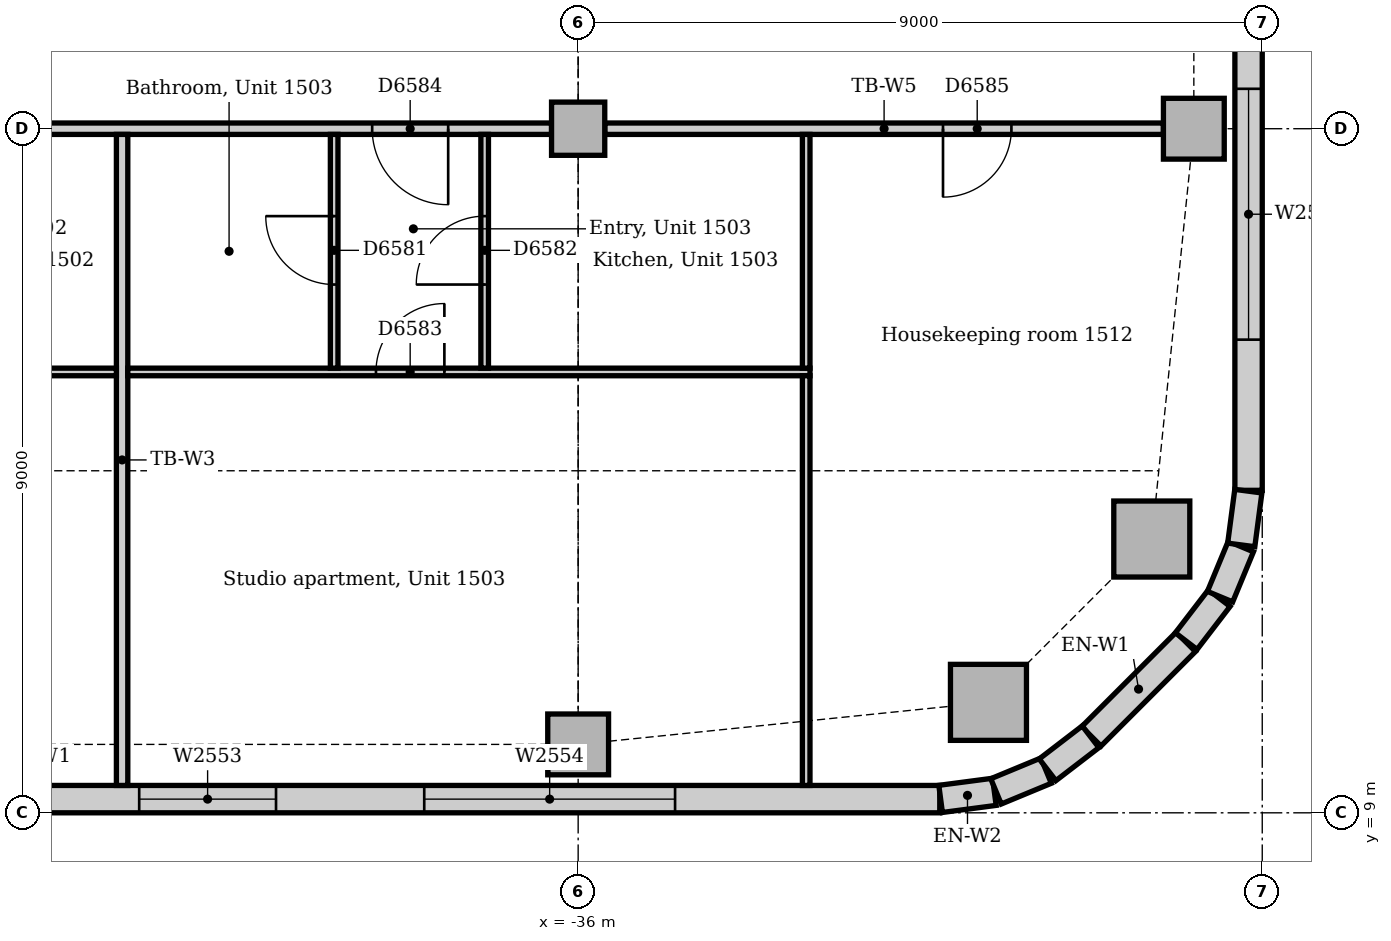
"""IFC4 building model, lengths in metres.
Left out: names, types, materials, properties, quantities, classifications, styles, units other than length and angle.
Written with IfcOpenShell. Run it as: python <this file> out.ifc"""

import sys

from ifc_helpers import new_model, si_unit, direction, frame, frame_2d, origin, origin_2d, place, context, subcontext, project, spatial, rectangle, extrude, element, fill, save


model = new_model("IFC4")
c1 = context("Model", 3, precision=1e-05, world=origin(), true_north=direction((0.0, 1.0)))
c2 = subcontext(c1, "Body", "Model", "MODEL_VIEW")
j1 = project(units=[si_unit("LENGTHUNIT", "METRE"), si_unit("PLANEANGLEUNIT", "RADIAN")], contexts=[c1])
p1 = place(None, origin())
s1 = spatial("IfcSite", under=j1, at=p1, CompositionType="ELEMENT")
p2 = place(p1, origin())
s2 = spatial("IfcBuilding", under=s1, at=p2, CompositionType="ELEMENT")
p3 = place(p2, frame((0.0, 0.0, 67.0)))
s3 = spatial("IfcBuildingStorey", under=s2, at=p3, CompositionType="ELEMENT", Elevation=67.0)
for number, where, z_axis, x_axis in (
    (1, (-30.602, 10.453, 0.0), (0.0, 0.0, 1.0), (1.0, 0.0, 0.0)),
    (2, (-28.453, 12.602, 0.0), (0.0, 0.0, 1.0), (1.0, 0.0, 0.0)),
):
    element("IfcColumn", number, at=place(p3, frame(where, z_axis=z_axis, x_axis=x_axis)), inside=s3, PredefinedType="COLUMN", context=c2, shape_type="SweptSolid", body=[
        extrude(rectangle(XDim=1.0, YDim=1.0, at=origin_2d()), origin(), (0.0, 0.0, 1.0), 3.85),
    ])
for number, where, z_axis, x_axis in (
    (3, (-36.0, 9.9, 0.0), (0.0, 0.0, 1.0), (1.0, 0.0, 0.0)),
    (4, (-27.9, 18.0, 0.0), (0.0, 0.0, 1.0), (1.0, 0.0, 0.0)),
):
    element("IfcColumn", number, at=place(p3, frame(where, z_axis=z_axis, x_axis=x_axis)), inside=s3, PredefinedType="COLUMN", context=c2, shape_type="SweptSolid", body=[
        extrude(rectangle(XDim=0.8, YDim=0.8, at=origin_2d()), origin(), (0.0, 0.0, 1.0), 3.85),
    ])
p4 = place(p3, frame((-36.0, 18.0, 0.0), z_axis=(0.0, 0.0, 1.0), x_axis=(1.0, 0.0, 0.0)))
e5 = element("IfcColumn", 5, at=p4, inside=s3, PredefinedType="COLUMN", context=c2, shape_type="SweptSolid", body=[
    extrude(rectangle(XDim=0.7, YDim=0.7, at=origin_2d()), origin(), (0.0, 0.0, 1.0), 3.85),
])
p5 = place(p3, frame((-55.007, 9.18, 0.0), z_axis=(0.0, 0.0, 1.0), x_axis=(1.0, 0.0, 0.0)))
e6 = element("IfcWall", 6, at=p5, inside=s3, PredefinedType="STANDARD", context=c2, shape_type="SweptSolid", body=[
    extrude(rectangle(XDim=23.765, YDim=0.36, at=frame_2d((11.882, 0.0))), origin(), (0.0, 0.0, 1.0), 3.85),
])
p6 = place(p5, frame((4.232, 0.0, 0.9)))
e7 = element("IfcOpeningElement", 7, at=p6, cuts=e6, PredefinedType="OPENING", context=c2, shape_type="SweptSolid", body=[
    extrude(rectangle(XDim=1.8, YDim=1.6, at=frame_2d((0.9, 0.8))), frame((0.0, 0.19, 0.0), z_axis=(0.0, -1.0, 0.0), x_axis=(1.0, 0.0, 0.0)), (0.0, 0.0, 1.0), 0.38),
])
p7 = place(p5, frame((7.982, 0.0, 0.9)))
e8 = element("IfcOpeningElement", 8, at=p7, cuts=e6, PredefinedType="OPENING", context=c2, shape_type="SweptSolid", body=[
    extrude(rectangle(XDim=3.3, YDim=1.6, at=frame_2d((1.65, 0.8))), frame((0.0, 0.19, 0.0), z_axis=(0.0, -1.0, 0.0), x_axis=(1.0, 0.0, 0.0)), (0.0, 0.0, 1.0), 0.38),
])
p8 = place(p5, frame((13.232, 0.0, 0.9)))
e9 = element("IfcOpeningElement", 9, at=p8, cuts=e6, PredefinedType="OPENING", context=c2, shape_type="SweptSolid", body=[
    extrude(rectangle(XDim=1.8, YDim=1.6, at=frame_2d((0.9, 0.8))), frame((0.0, 0.19, 0.0), z_axis=(0.0, -1.0, 0.0), x_axis=(1.0, 0.0, 0.0)), (0.0, 0.0, 1.0), 0.38),
])
p9 = place(p5, frame((16.982, 0.0, 0.9)))
e10 = element("IfcOpeningElement", 10, at=p9, cuts=e6, PredefinedType="OPENING", context=c2, shape_type="SweptSolid", body=[
    extrude(rectangle(XDim=3.3, YDim=1.6, at=frame_2d((1.65, 0.8))), frame((0.0, 0.19, 0.0), z_axis=(0.0, -1.0, 0.0), x_axis=(1.0, 0.0, 0.0)), (0.0, 0.0, 1.0), 0.38),
])
p10 = place(p3, frame((-29.249, 10.006, 0.0), z_axis=(0.0, 0.0, 1.0), x_axis=(0.707106781187, 0.707106781187, 0.0)))
e11 = element("IfcWall", 11, at=p10, inside=s3, PredefinedType="STANDARD", context=c2, shape_type="SweptSolid", body=[
    extrude(rectangle(XDim=1.757, YDim=0.36, at=frame_2d((0.879, 0.0))), origin(), (0.0, 0.0, 1.0), 3.85),
])
p11 = place(p3, frame((-27.18, 13.243, 0.0), z_axis=(0.0, 0.0, 1.0), x_axis=(0.0, 1.0, 0.0)))
e12 = element("IfcWall", 12, at=p11, inside=s3, PredefinedType="STANDARD", context=c2, shape_type="SweptSolid", body=[
    extrude(rectangle(XDim=7.757, YDim=0.36, at=frame_2d((3.879, 0.0))), origin(), (0.0, 0.0, 1.0), 3.85),
])
p12 = place(p11, frame((1.982, 0.0, 0.9)))
e13 = element("IfcOpeningElement", 13, at=p12, cuts=e12, PredefinedType="OPENING", context=c2, shape_type="SweptSolid", body=[
    extrude(rectangle(XDim=3.3, YDim=1.6, at=frame_2d((1.65, 0.8))), frame((0.0, 0.19, 0.0), z_axis=(0.0, -1.0, 0.0), x_axis=(1.0, 0.0, 0.0)), (0.0, 0.0, 1.0), 0.38),
])
for number, where, z_axis, x_axis in (
    (14, (-31.231, 9.183, 0.0), (0.0, 0.0, 1.0), (0.991, 0.131, 0.0)),
    (15, (-30.503, 9.282, 0.0), (0.0, 0.0, 1.0), (0.924, 0.383, 0.0)),
):
    element("IfcWall", number, at=place(p3, frame(where, z_axis=z_axis, x_axis=x_axis)), inside=s3, PredefinedType="STANDARD", context=c2, shape_type="SweptSolid", body=[
        extrude(rectangle(XDim=0.713, YDim=0.36, at=frame_2d((0.356, 0.0))), origin(), (0.0, 0.0, 1.0), 3.85),
    ])
for number, where, z_axis, x_axis in (
    (16, (-29.825, 9.566, 0.0), (0.0, 0.0, 1.0), (0.793, 0.609, 0.0)),
    (17, (-28.0, 11.259, 0.0), (0.0, 0.0, 1.0), (0.609, 0.793, 0.0)),
):
    element("IfcWall", number, at=place(p3, frame(where, z_axis=z_axis, x_axis=x_axis)), inside=s3, PredefinedType="STANDARD", context=c2, shape_type="SweptSolid", body=[
        extrude(rectangle(XDim=0.713, YDim=0.36, at=frame_2d((0.357, 0.0))), origin(), (0.0, 0.0, 1.0), 3.85),
    ])
for number, where, z_axis, x_axis in (
    (18, (-27.555, 11.844, 0.0), (0.0, 0.0, 1.0), (0.383, 0.924, 0.0)),
    (19, (-27.276, 12.524, 0.0), (0.0, 0.0, 1.0), (0.131, 0.991, 0.0)),
):
    element("IfcWall", number, at=place(p3, frame(where, z_axis=z_axis, x_axis=x_axis)), inside=s3, PredefinedType="STANDARD", context=c2, shape_type="SweptSolid", body=[
        extrude(rectangle(XDim=0.713, YDim=0.36, at=frame_2d((0.356, 0.0))), origin(), (0.0, 0.0, 1.0), 3.85),
    ])
p13 = place(p3, frame((-35.65, 18.0, 0.0), z_axis=(0.0, 0.0, 1.0), x_axis=(1.0, 0.0, 0.0)))
e20 = element("IfcWall", 20, at=p13, inside=s3, PredefinedType="PARTITIONING", context=c2, shape_type="SweptSolid", body=[
    extrude(rectangle(XDim=7.35, YDim=0.15, at=frame_2d((3.675, 0.0))), origin(), (0.0, 0.0, 1.0), 3.158),
])
p14 = place(p13, frame((4.45, 0.0, 0.0)))
e21 = element("IfcOpeningElement", 21, at=p14, cuts=e20, PredefinedType="OPENING", context=c2, shape_type="SweptSolid", body=[
    extrude(rectangle(XDim=0.9, YDim=2.1, at=frame_2d((0.45, 1.05))), frame((0.0, 0.085, 0.0), z_axis=(0.0, -1.0, 0.0), x_axis=(1.0, 0.0, 0.0)), (0.0, 0.0, 1.0), 0.17),
])
p15 = place(p3, frame((-44.65, 18.0, 0.0), z_axis=(0.0, 0.0, 1.0), x_axis=(1.0, 0.0, 0.0)))
e22 = element("IfcWall", 22, at=p15, inside=s3, PredefinedType="PARTITIONING", context=c2, shape_type="SweptSolid", body=[
    extrude(rectangle(XDim=8.3, YDim=0.15, at=frame_2d((4.15, 0.0))), origin(), (0.0, 0.0, 1.0), 3.158),
])
p16 = place(p15, frame((5.94, 0.0, 0.0)))
e23 = element("IfcOpeningElement", 23, at=p16, cuts=e22, PredefinedType="OPENING", context=c2, shape_type="SweptSolid", body=[
    extrude(rectangle(XDim=1.0, YDim=2.1, at=frame_2d((0.5, 1.05))), frame((0.0, 0.085, 0.0), z_axis=(0.0, -1.0, 0.0), x_axis=(1.0, 0.0, 0.0)), (0.0, 0.0, 1.0), 0.17),
])
p17 = place(p3, frame((-42.0, 9.36, 0.0), z_axis=(0.0, 0.0, 1.0), x_axis=(0.0, 1.0, 0.0)))
e24 = element("IfcWall", 24, at=p17, inside=s3, PredefinedType="PARTITIONING", context=c2, shape_type="SweptSolid", body=[
    extrude(rectangle(XDim=8.565, YDim=0.15, at=frame_2d((4.282, 0.0))), origin(), (0.0, 0.0, 1.0), 3.85),
])
p18 = place(p3, frame((-51.05, 14.8, 0.0), z_axis=(0.0, 0.0, 1.0), x_axis=(1.0, 0.0, 0.0)))
e25 = element("IfcWall", 25, at=p18, inside=s3, PredefinedType="PARTITIONING", context=c2, shape_type="SweptSolid", body=[
    extrude(rectangle(XDim=8.975, YDim=0.1, at=frame_2d((4.487, 0.0))), origin(), (0.0, 0.0, 1.0), 3.85),
])
p19 = place(p18, frame((3.39, 0.0, 0.0)))
e26 = element("IfcOpeningElement", 26, at=p19, cuts=e25, PredefinedType="OPENING", context=c2, shape_type="SweptSolid", body=[
    extrude(rectangle(XDim=0.9, YDim=2.1, at=frame_2d((0.45, 1.05))), frame((0.0, 0.06, 0.0), z_axis=(0.0, -1.0, 0.0), x_axis=(1.0, 0.0, 0.0)), (0.0, 0.0, 1.0), 0.12),
])
p20 = place(p3, frame((-41.925, 14.8, 0.0), z_axis=(0.0, 0.0, 1.0), x_axis=(1.0, 0.0, 0.0)))
e27 = element("IfcWall", 27, at=p20, inside=s3, PredefinedType="PARTITIONING", context=c2, shape_type="SweptSolid", body=[
    extrude(rectangle(XDim=8.975, YDim=0.1, at=frame_2d((4.487, 0.0))), origin(), (0.0, 0.0, 1.0), 3.85),
])
p21 = place(p20, frame((3.265, 0.0, 0.0)))
e28 = element("IfcOpeningElement", 28, at=p21, cuts=e27, PredefinedType="OPENING", context=c2, shape_type="SweptSolid", body=[
    extrude(rectangle(XDim=0.9, YDim=2.1, at=frame_2d((0.45, 1.05))), frame((0.0, 0.06, 0.0), z_axis=(0.0, -1.0, 0.0), x_axis=(1.0, 0.0, 0.0)), (0.0, 0.0, 1.0), 0.12),
])
p22 = place(p3, frame((-33.0, 14.85, 0.0), z_axis=(0.0, 0.0, 1.0), x_axis=(0.0, 1.0, 0.0)))
e29 = element("IfcWall", 29, at=p22, inside=s3, PredefinedType="PARTITIONING", context=c2, shape_type="SweptSolid", body=[
    extrude(rectangle(XDim=3.075, YDim=0.1, at=frame_2d((1.538, 0.0))), origin(), (0.0, 0.0, 1.0), 3.85),
])
p23 = place(p3, frame((-33.0, 9.36, 0.0), z_axis=(0.0, 0.0, 1.0), x_axis=(0.0, 1.0, 0.0)))
e30 = element("IfcWall", 30, at=p23, inside=s3, PredefinedType="PARTITIONING", context=c2, shape_type="SweptSolid", body=[
    extrude(rectangle(XDim=5.39, YDim=0.1, at=frame_2d((2.695, 0.0))), origin(), (0.0, 0.0, 1.0), 3.85),
])
p24 = place(p3, frame((-39.21, 14.85, 0.0), z_axis=(0.0, 0.0, 1.0), x_axis=(0.0, 1.0, 0.0)))
e31 = element("IfcWall", 31, at=p24, inside=s3, PredefinedType="PARTITIONING", context=c2, shape_type="SweptSolid", body=[
    extrude(rectangle(XDim=3.075, YDim=0.1, at=frame_2d((1.538, 0.0))), origin(), (0.0, 0.0, 1.0), 3.85),
])
p25 = place(p24, frame((1.1, 0.0, 0.0)))
e32 = element("IfcOpeningElement", 32, at=p25, cuts=e31, PredefinedType="OPENING", context=c2, shape_type="SweptSolid", body=[
    extrude(rectangle(XDim=0.9, YDim=2.1, at=frame_2d((0.45, 1.05))), frame((0.0, 0.06, 0.0), z_axis=(0.0, -1.0, 0.0), x_axis=(1.0, 0.0, 0.0)), (0.0, 0.0, 1.0), 0.12),
])
p26 = place(p3, frame((-37.23, 14.85, 0.0), z_axis=(0.0, 0.0, 1.0), x_axis=(0.0, 1.0, 0.0)))
e33 = element("IfcWall", 33, at=p26, inside=s3, PredefinedType="PARTITIONING", context=c2, shape_type="SweptSolid", body=[
    extrude(rectangle(XDim=3.075, YDim=0.1, at=frame_2d((1.538, 0.0))), origin(), (0.0, 0.0, 1.0), 3.85),
])
p27 = place(p26, frame((1.1, 0.0, 0.0)))
e34 = element("IfcOpeningElement", 34, at=p27, cuts=e33, PredefinedType="OPENING", context=c2, shape_type="SweptSolid", body=[
    extrude(rectangle(XDim=0.9, YDim=2.1, at=frame_2d((0.45, 1.05))), frame((0.0, 0.06, 0.0), z_axis=(0.0, -1.0, 0.0), x_axis=(1.0, 0.0, 0.0)), (0.0, 0.0, 1.0), 0.12),
])
p28 = place(p8, origin())
e35 = element("IfcWindow", 35, at=p28, inside=s3, PartitioningType="SINGLE_PANEL", PredefinedType="WINDOW", context=c2, shape_type="SweptSolid", body=[
    extrude(rectangle(XDim=1.8, YDim=1.6, at=frame_2d((0.9, 0.8))), frame((0.0, 0.13, 0.0), z_axis=(0.0, -1.0, 0.0), x_axis=(1.0, 0.0, 0.0)), (0.0, 0.0, 1.0), 0.06),
])
fill(e9, e35)
p29 = place(p9, origin())
e36 = element("IfcWindow", 36, at=p29, inside=s3, PartitioningType="SINGLE_PANEL", PredefinedType="WINDOW", context=c2, shape_type="SweptSolid", body=[
    extrude(rectangle(XDim=3.3, YDim=1.6, at=frame_2d((1.65, 0.8))), frame((0.0, 0.13, 0.0), z_axis=(0.0, -1.0, 0.0), x_axis=(1.0, 0.0, 0.0)), (0.0, 0.0, 1.0), 0.06),
])
fill(e10, e36)
p30 = place(p12, origin())
e37 = element("IfcWindow", 37, at=p30, inside=s3, PartitioningType="SINGLE_PANEL", PredefinedType="WINDOW", context=c2, shape_type="SweptSolid", body=[
    extrude(rectangle(XDim=3.3, YDim=1.6, at=frame_2d((1.65, 0.8))), frame((0.0, 0.13, 0.0), z_axis=(0.0, -1.0, 0.0), x_axis=(1.0, 0.0, 0.0)), (0.0, 0.0, 1.0), 0.06),
])
fill(e13, e37)
p31 = place(p25, origin())
e38 = element("IfcDoor", 38, at=p31, inside=s3, OperationType="SINGLE_SWING_RIGHT", PredefinedType="DOOR", context=c2, shape_type="SweptSolid", body=[
    extrude(rectangle(XDim=0.9, YDim=2.1, at=frame_2d((0.45, 1.05))), frame((0.0, 0.025, 0.0), z_axis=(0.0, -1.0, 0.0), x_axis=(1.0, 0.0, 0.0)), (0.0, 0.0, 1.0), 0.05),
])
fill(e32, e38)
p32 = place(p27, origin())
e39 = element("IfcDoor", 39, at=p32, inside=s3, OperationType="SINGLE_SWING_LEFT", PredefinedType="DOOR", context=c2, shape_type="SweptSolid", body=[
    extrude(rectangle(XDim=0.9, YDim=2.1, at=frame_2d((0.45, 1.05))), frame((0.0, 0.025, 0.0), z_axis=(0.0, -1.0, 0.0), x_axis=(1.0, 0.0, 0.0)), (0.0, 0.0, 1.0), 0.05),
])
fill(e34, e39)
p33 = place(p21, origin())
e40 = element("IfcDoor", 40, at=p33, inside=s3, OperationType="SINGLE_SWING_RIGHT", PredefinedType="DOOR", context=c2, shape_type="SweptSolid", body=[
    extrude(rectangle(XDim=0.9, YDim=2.1, at=frame_2d((0.45, 1.05))), frame((0.0, 0.025, 0.0), z_axis=(0.0, -1.0, 0.0), x_axis=(1.0, 0.0, 0.0)), (0.0, 0.0, 1.0), 0.05),
])
fill(e28, e40)
p34 = place(p16, frame((1.0, 0.0, 0.0), z_axis=(0.0, 0.0, 1.0), x_axis=(-1.0, 0.0, 0.0)))
e41 = element("IfcDoor", 41, at=p34, inside=s3, OperationType="SINGLE_SWING_LEFT", PredefinedType="DOOR", context=c2, shape_type="SweptSolid", body=[
    extrude(rectangle(XDim=1.0, YDim=2.1, at=frame_2d((0.5, 1.05))), frame((0.0, 0.025, 0.0), z_axis=(0.0, -1.0, 0.0), x_axis=(1.0, 0.0, 0.0)), (0.0, 0.0, 1.0), 0.05),
])
fill(e23, e41)
p35 = place(p14, frame((0.9, 0.0, 0.0), z_axis=(0.0, 0.0, 1.0), x_axis=(-1.0, 0.0, 0.0)))
e42 = element("IfcDoor", 42, at=p35, inside=s3, OperationType="SINGLE_SWING_RIGHT", PredefinedType="DOOR", context=c2, shape_type="SweptSolid", body=[
    extrude(rectangle(XDim=0.9, YDim=2.1, at=frame_2d((0.45, 1.05))), frame((0.0, 0.025, 0.0), z_axis=(0.0, -1.0, 0.0), x_axis=(1.0, 0.0, 0.0)), (0.0, 0.0, 1.0), 0.05),
])
fill(e21, e42)
save(model, sys.argv[1])
